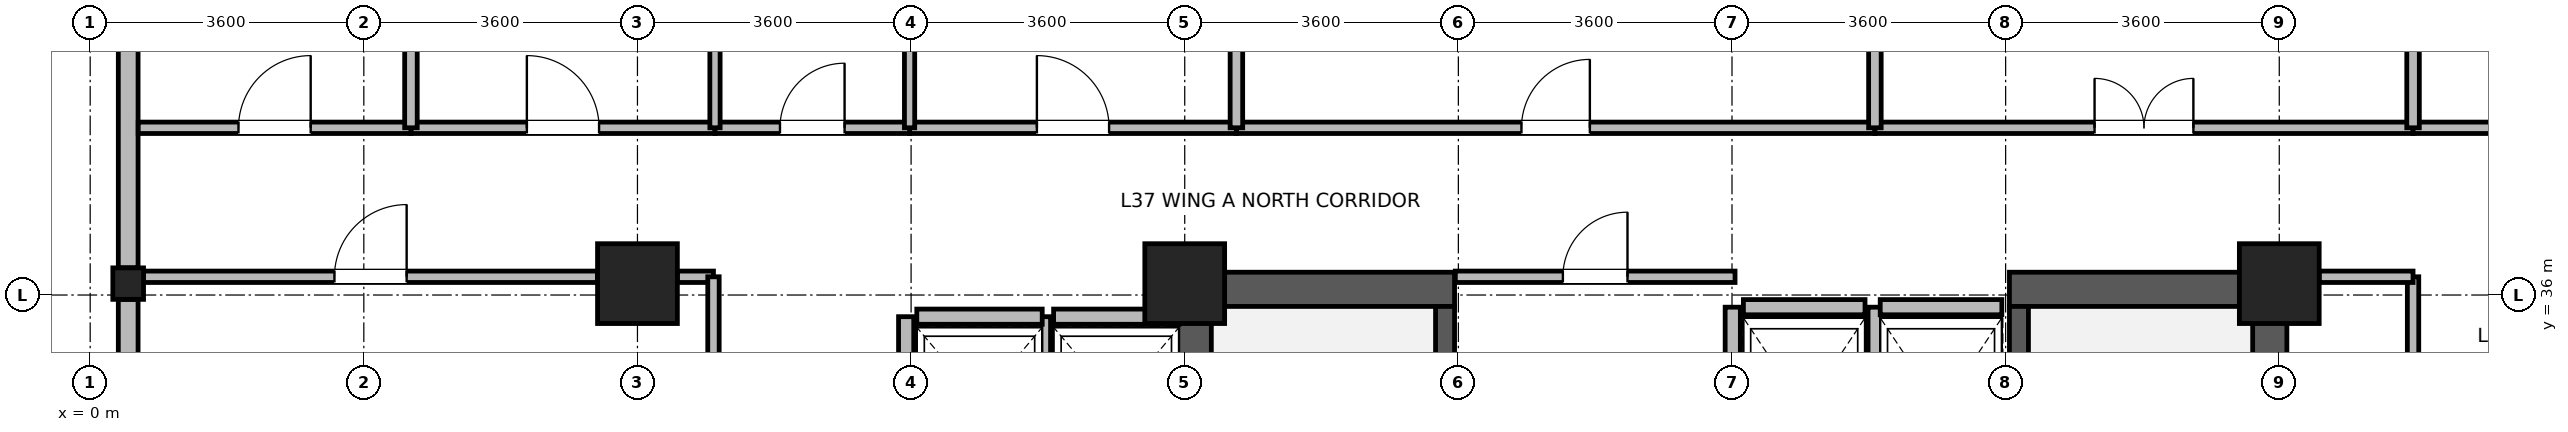
"""IFC4 building model, lengths in metres.
Left out: names, types, materials, properties, quantities, classifications, styles, units other than length and angle.
Written with IfcOpenShell. Run it as: python <this file> out.ifc"""

import sys

from ifc_helpers import new_model, si_unit, direction, frame, frame_2d, origin, origin_2d, place, context, subcontext, project, spatial, rectangle, i_section, extrude, source, transform, mapped, element, fill, save


model = new_model("IFC4")
c1 = context("Model", 3, precision=1e-05, world=origin(), true_north=direction((0.0, 1.0)))
c2 = subcontext(c1, "Body", "Model", "MODEL_VIEW")
j1 = project(units=[si_unit("LENGTHUNIT", "METRE"), si_unit("PLANEANGLEUNIT", "RADIAN")], contexts=[c1])
p1 = place(None, origin())
s1 = spatial("IfcSite", under=j1, at=p1, CompositionType="ELEMENT")
p2 = place(p1, origin())
s2 = spatial("IfcBuilding", under=s1, at=p2, CompositionType="ELEMENT")
p3 = place(p2, frame((0.0, 0.0, 147.6)))
s3 = spatial("IfcBuildingStorey", under=s2, at=p3, CompositionType="ELEMENT", Elevation=147.6)
for number, where, z_axis, x_axis in (
    (1, (14.525, 28.4, 0.0), (0.0, 0.0, 1.0), (0.0, 1.0, 0.0)),
    (2, (28.675, 28.4, 0.0), (0.0, 0.0, 1.0), (0.0, 1.0, 0.0)),
):
    element("IfcWall", number, at=place(p3, frame(where, z_axis=z_axis, x_axis=x_axis)), inside=s3, PredefinedType="SHEAR", context=c2, shape_type="SweptSolid", body=[
        extrude(rectangle(XDim=7.9, YDim=0.45, at=frame_2d((3.95, 0.0))), origin(), (0.0, 0.0, 1.0), 3.46),
    ])
for number, where, z_axis, x_axis in (
    (3, (14.75, 36.075, 0.0), (0.0, 0.0, 1.0), (1.0, 0.0, 0.0)),
    (4, (25.25, 36.075, 0.0), (0.0, 0.0, 1.0), (1.0, 0.0, 0.0)),
):
    element("IfcWall", number, at=place(p3, frame(where, z_axis=z_axis, x_axis=x_axis)), inside=s3, PredefinedType="SHEAR", context=c2, shape_type="SweptSolid", body=[
        extrude(rectangle(XDim=3.2, YDim=0.45, at=frame_2d((1.6, 0.0))), origin(), (0.0, 0.0, 1.0), 3.46),
    ])
p4 = place(p3, frame((17.825, 28.85, 0.0), z_axis=(0.0, 0.0, 1.0), x_axis=(0.0, 1.0, 0.0)))
e5 = element("IfcWall", 5, at=p4, inside=s3, PredefinedType="SHEAR", context=c2, shape_type="SweptSolid", body=[
    extrude(rectangle(XDim=7.0, YDim=0.25, at=frame_2d((3.5, 0.0))), origin(), (0.0, 0.0, 1.0), 3.46),
])
p5 = place(p4, frame((0.15, 0.0, 0.0)))
e6 = element("IfcOpeningElement", 6, at=p5, cuts=e5, PredefinedType="OPENING", context=c2, shape_type="SweptSolid", body=[
    extrude(rectangle(XDim=1.1, YDim=2.08, at=frame_2d((0.55, 1.04))), frame((0.0, 0.135, 0.0), z_axis=(0.0, -1.0, 0.0), x_axis=(1.0, 0.0, 0.0)), (0.0, 0.0, 1.0), 0.27),
])
p6 = place(p3, frame((25.375, 28.85, 0.0), z_axis=(0.0, 0.0, 1.0), x_axis=(0.0, 1.0, 0.0)))
e7 = element("IfcWall", 7, at=p6, inside=s3, PredefinedType="SHEAR", context=c2, shape_type="SweptSolid", body=[
    extrude(rectangle(XDim=7.0, YDim=0.25, at=frame_2d((3.5, 0.0))), origin(), (0.0, 0.0, 1.0), 3.46),
])
p7 = place(p6, frame((0.15, 0.0, 0.0)))
e8 = element("IfcOpeningElement", 8, at=p7, cuts=e7, PredefinedType="OPENING", context=c2, shape_type="SweptSolid", body=[
    extrude(rectangle(XDim=1.1, YDim=2.08, at=frame_2d((0.55, 1.04))), frame((0.0, 0.135, 0.0), z_axis=(0.0, -1.0, 0.0), x_axis=(1.0, 0.0, 0.0)), (0.0, 0.0, 1.0), 0.27),
])
m1 = source(origin(), c2, "Body", "SweptSolid", [
    extrude(rectangle(XDim=1.05, YDim=1.05, at=origin_2d()), origin(), (0.0, 0.0, 1.0), 3.7),
])
for number, where, z_axis, x_axis in (
    (9, (7.2, 36.15, 0.0), (0.0, 0.0, 1.0), (1.0, 0.0, 0.0)),
    (10, (14.4, 36.15, 0.0), (0.0, 0.0, 1.0), (1.0, 0.0, 0.0)),
    (11, (28.8, 36.15, 0.0), (0.0, 0.0, 1.0), (1.0, 0.0, 0.0)),
):
    element("IfcColumn", number, at=place(p3, frame(where, z_axis=z_axis, x_axis=x_axis)), inside=s3, PredefinedType="COLUMN", context=c2, shape_type="MappedRepresentation", body=[
        mapped(m1, transform((0.0, 0.0, 0.0), x_axis=(1.0, 0.0, 0.0), y_axis=(0.0, 1.0, 0.0), z_axis=(0.0, 0.0, 1.0), scale=1.0)),
    ])
m2 = source(origin(), c2, "Body", "SweptSolid", [
    extrude(i_section(OverallWidth=0.404, OverallDepth=0.414, WebThickness=0.021, FlangeThickness=0.028, FilletRadius=0.015, at=origin_2d()), origin(), (0.0, 0.0, 1.0), 3.7),
])
p8 = place(p3, frame((0.5, 36.15, 0.0), z_axis=(0.0, 0.0, 1.0), x_axis=(1.0, 0.0, 0.0)))
e12 = element("IfcColumn", 12, at=p8, inside=s3, PredefinedType="COLUMN", context=c2, shape_type="MappedRepresentation", body=[
    mapped(m2, transform((0.0, 0.0, 0.0), x_axis=(1.0, 0.0, 0.0), y_axis=(0.0, 1.0, 0.0), z_axis=(0.0, 0.0, 1.0), scale=1.0)),
])
p9 = place(p3, frame((0.5, 36.358, 0.0), z_axis=(0.0, 0.0, 1.0), x_axis=(0.0, 1.0, 0.0)))
e13 = element("IfcWall", 13, at=p9, inside=s3, PredefinedType="STANDARD", context=c2, shape_type="SweptSolid", body=[
    extrude(rectangle(XDim=6.972, YDim=0.26, at=frame_2d((3.486, 0.0))), origin(), (0.0, 0.0, 1.0), 3.44),
])
p10 = place(p9, frame((4.329, 0.0, 0.85)))
e14 = element("IfcOpeningElement", 14, at=p10, cuts=e13, PredefinedType="OPENING", context=c2, shape_type="SweptSolid", body=[
    extrude(rectangle(XDim=1.8, YDim=1.85, at=frame_2d((0.9, 0.925))), frame((0.0, 0.14, 0.0), z_axis=(0.0, -1.0, 0.0), x_axis=(1.0, 0.0, 0.0)), (0.0, 0.0, 1.0), 0.28),
])
p11 = place(p9, frame((3.011, 0.0, 0.85)))
e15 = element("IfcOpeningElement", 15, at=p11, cuts=e13, PredefinedType="OPENING", context=c2, shape_type="SweptSolid", body=[
    extrude(rectangle(XDim=0.95, YDim=1.75, at=frame_2d((0.475, 0.875))), frame((0.0, 0.14, 0.0), z_axis=(0.0, -1.0, 0.0), x_axis=(1.0, 0.0, 0.0)), (0.0, 0.0, 1.0), 0.28),
])
p12 = place(p3, frame((0.5, 28.858, 0.0), z_axis=(0.0, 0.0, 1.0), x_axis=(0.0, 1.0, 0.0)))
e16 = element("IfcWall", 16, at=p12, inside=s3, PredefinedType="STANDARD", context=c2, shape_type="SweptSolid", body=[
    extrude(rectangle(XDim=7.084, YDim=0.26, at=frame_2d((3.542, 0.0))), origin(), (0.0, 0.0, 1.0), 2.99),
])
p13 = place(p12, frame((0.871, 0.0, 0.85)))
e17 = element("IfcOpeningElement", 17, at=p13, cuts=e16, PredefinedType="OPENING", context=c2, shape_type="SweptSolid", body=[
    extrude(rectangle(XDim=1.8, YDim=1.85, at=frame_2d((0.9, 0.925))), frame((0.0, 0.14, 0.0), z_axis=(0.0, -1.0, 0.0), x_axis=(1.0, 0.0, 0.0)), (0.0, 0.0, 1.0), 0.28),
])
p14 = place(p12, frame((4.413, 0.0, 0.85)))
e18 = element("IfcOpeningElement", 18, at=p14, cuts=e16, PredefinedType="OPENING", context=c2, shape_type="SweptSolid", body=[
    extrude(rectangle(XDim=1.8, YDim=1.85, at=frame_2d((0.9, 0.925))), frame((0.0, 0.14, 0.0), z_axis=(0.0, -1.0, 0.0), x_axis=(1.0, 0.0, 0.0)), (0.0, 0.0, 1.0), 0.28),
])
p15 = place(p3, frame((12.675, 35.715, 0.0), z_axis=(0.0, 0.0, 1.0), x_axis=(1.0, 0.0, 0.0)))
e19 = element("IfcWall", 19, at=p15, inside=s3, PredefinedType="PARTITIONING", context=c2, shape_type="SweptSolid", body=[
    extrude(rectangle(XDim=1.65, YDim=0.2, at=frame_2d((0.825, 0.0))), origin(), (0.0, 0.0, 1.0), 3.44),
])
p16 = place(p3, frame((12.535, 33.485, 0.0), z_axis=(0.0, 0.0, 1.0), x_axis=(0.0, 1.0, 0.0)))
e20 = element("IfcWall", 20, at=p16, inside=s3, PredefinedType="PARTITIONING", context=c2, shape_type="SweptSolid", body=[
    extrude(rectangle(XDim=2.23, YDim=0.2, at=frame_2d((1.115, 0.0))), origin(), (0.0, 0.0, 1.0), 3.44),
])
p17 = place(p3, frame((10.875, 35.715, 0.0), z_axis=(0.0, 0.0, 1.0), x_axis=(1.0, 0.0, 0.0)))
e21 = element("IfcWall", 21, at=p17, inside=s3, PredefinedType="PARTITIONING", context=c2, shape_type="SweptSolid", body=[
    extrude(rectangle(XDim=1.65, YDim=0.2, at=frame_2d((0.825, 0.0))), origin(), (0.0, 0.0, 1.0), 3.44),
])
p18 = place(p3, frame((10.735, 33.485, 0.0), z_axis=(0.0, 0.0, 1.0), x_axis=(0.0, 1.0, 0.0)))
e22 = element("IfcWall", 22, at=p18, inside=s3, PredefinedType="PARTITIONING", context=c2, shape_type="SweptSolid", body=[
    extrude(rectangle(XDim=2.23, YDim=0.2, at=frame_2d((1.115, 0.0))), origin(), (0.0, 0.0, 1.0), 3.44),
])
p19 = place(p3, frame((21.75, 35.84, 0.0), z_axis=(0.0, 0.0, 1.0), x_axis=(1.0, 0.0, 0.0)))
e23 = element("IfcWall", 23, at=p19, inside=s3, PredefinedType="PARTITIONING", context=c2, shape_type="SweptSolid", body=[
    extrude(rectangle(XDim=1.6, YDim=0.2, at=frame_2d((0.8, 0.0))), origin(), (0.0, 0.0, 1.0), 2.44),
])
for number, where, z_axis, x_axis in (
    (24, (21.61, 33.16, 0.0), (0.0, 0.0, 1.0), (0.0, 1.0, 0.0)),
    (25, (23.49, 33.16, 0.0), (0.0, 0.0, 1.0), (0.0, 1.0, 0.0)),
):
    element("IfcWall", number, at=place(p3, frame(where, z_axis=z_axis, x_axis=x_axis)), inside=s3, PredefinedType="PARTITIONING", context=c2, shape_type="SweptSolid", body=[
        extrude(rectangle(XDim=2.68, YDim=0.2, at=frame_2d((1.34, 0.0))), origin(), (0.0, 0.0, 1.0), 3.44),
    ])
p20 = place(p3, frame((23.55, 35.84, 0.0), z_axis=(0.0, 0.0, 1.0), x_axis=(1.0, 0.0, 0.0)))
e26 = element("IfcWall", 26, at=p20, inside=s3, PredefinedType="PARTITIONING", context=c2, shape_type="SweptSolid", body=[
    extrude(rectangle(XDim=1.6, YDim=0.2, at=frame_2d((0.8, 0.0))), origin(), (0.0, 0.0, 1.0), 2.44),
])
p21 = place(p3, frame((15.08, 38.2, 0.0), z_axis=(0.0, 0.0, 1.0), x_axis=(1.0, 0.0, 0.0)))
e27 = element("IfcWall", 27, at=p21, inside=s3, PredefinedType="PARTITIONING", context=c2, shape_type="SweptSolid", body=[
    extrude(rectangle(XDim=8.4, YDim=0.15, at=frame_2d((4.2, 0.0))), origin(), (0.0, 0.0, 1.0), 3.44),
])
p22 = place(p21, frame((3.75, 0.0, 0.0)))
e28 = element("IfcOpeningElement", 28, at=p22, cuts=e27, PredefinedType="OPENING", context=c2, shape_type="SweptSolid", body=[
    extrude(rectangle(XDim=0.9, YDim=2.08, at=frame_2d((0.45, 1.04))), frame((0.0, 0.085, 0.0), z_axis=(0.0, -1.0, 0.0), x_axis=(1.0, 0.0, 0.0)), (0.0, 0.0, 1.0), 0.17),
])
p23 = place(p3, frame((0.702, 36.24, 0.0), z_axis=(0.0, 0.0, 1.0), x_axis=(1.0, 0.0, 0.0)))
e29 = element("IfcWall", 29, at=p23, inside=s3, PredefinedType="PARTITIONING", context=c2, shape_type="SweptSolid", body=[
    extrude(rectangle(XDim=5.973, YDim=0.15, at=frame_2d((2.987, 0.0))), origin(), (0.0, 0.0, 1.0), 2.84),
])
p24 = place(p23, frame((2.511, 0.0, 0.0)))
e30 = element("IfcOpeningElement", 30, at=p24, cuts=e29, PredefinedType="OPENING", context=c2, shape_type="SweptSolid", body=[
    extrude(rectangle(XDim=0.95, YDim=2.1, at=frame_2d((0.475, 1.05))), frame((0.0, 0.085, 0.0), z_axis=(0.0, -1.0, 0.0), x_axis=(1.0, 0.0, 0.0)), (0.0, 0.0, 1.0), 0.17),
])
p25 = place(p3, frame((7.725, 36.24, 0.0), z_axis=(0.0, 0.0, 1.0), x_axis=(1.0, 0.0, 0.0)))
e31 = element("IfcWall", 31, at=p25, inside=s3, PredefinedType="PARTITIONING", context=c2, shape_type="SweptSolid", body=[
    extrude(rectangle(XDim=0.475, YDim=0.15, at=frame_2d((0.237, 0.0))), origin(), (0.0, 0.0, 1.0), 2.84),
])
p26 = place(p3, frame((23.48, 38.2, 0.0), z_axis=(0.0, 0.0, 1.0), x_axis=(1.0, 0.0, 0.0)))
e32 = element("IfcWall", 32, at=p26, inside=s3, PredefinedType="PARTITIONING", context=c2, shape_type="SweptSolid", body=[
    extrude(rectangle(XDim=7.08, YDim=0.15, at=frame_2d((3.54, 0.0))), origin(), (0.0, 0.0, 1.0), 3.44),
])
p27 = place(p26, frame((2.89, 0.0, 0.0)))
e33 = element("IfcOpeningElement", 33, at=p27, cuts=e32, PredefinedType="OPENING", context=c2, shape_type="SweptSolid", body=[
    extrude(rectangle(XDim=1.3, YDim=2.12, at=frame_2d((0.65, 1.06))), frame((0.0, 0.085, 0.0), z_axis=(0.0, -1.0, 0.0), x_axis=(1.0, 0.0, 0.0)), (0.0, 0.0, 1.0), 0.17),
])
p28 = place(p3, frame((30.56, 38.2, 0.0), z_axis=(0.0, 0.0, 1.0), x_axis=(1.0, 0.0, 0.0)))
e34 = element("IfcWall", 34, at=p28, inside=s3, PredefinedType="PARTITIONING", context=c2, shape_type="SweptSolid", body=[
    extrude(rectangle(XDim=4.8, YDim=0.15, at=frame_2d((2.4, 0.0))), origin(), (0.0, 0.0, 1.0), 3.44),
])
p29 = place(p28, frame((1.75, 0.0, 0.0)))
e35 = element("IfcOpeningElement", 35, at=p29, cuts=e34, PredefinedType="OPENING", context=c2, shape_type="SweptSolid", body=[
    extrude(rectangle(XDim=1.3, YDim=2.12, at=frame_2d((0.65, 1.06))), frame((0.0, 0.085, 0.0), z_axis=(0.0, -1.0, 0.0), x_axis=(1.0, 0.0, 0.0)), (0.0, 0.0, 1.0), 0.17),
])
p30 = place(p3, frame((10.78, 38.2, 0.0), z_axis=(0.0, 0.0, 1.0), x_axis=(1.0, 0.0, 0.0)))
e36 = element("IfcWall", 36, at=p30, inside=s3, PredefinedType="PARTITIONING", context=c2, shape_type="SweptSolid", body=[
    extrude(rectangle(XDim=4.3, YDim=0.15, at=frame_2d((2.15, 0.0))), origin(), (0.0, 0.0, 1.0), 3.44),
])
p31 = place(p30, frame((1.675, 0.0, 0.0)))
e37 = element("IfcOpeningElement", 37, at=p31, cuts=e36, PredefinedType="OPENING", context=c2, shape_type="SweptSolid", body=[
    extrude(rectangle(XDim=0.95, YDim=2.1, at=frame_2d((0.475, 1.05))), frame((0.0, 0.085, 0.0), z_axis=(0.0, -1.0, 0.0), x_axis=(1.0, 0.0, 0.0)), (0.0, 0.0, 1.0), 0.17),
])
p32 = place(p3, frame((4.22, 38.2, 0.0), z_axis=(0.0, 0.0, 1.0), x_axis=(1.0, 0.0, 0.0)))
e38 = element("IfcWall", 38, at=p32, inside=s3, PredefinedType="PARTITIONING", context=c2, shape_type="SweptSolid", body=[
    extrude(rectangle(XDim=4.0, YDim=0.15, at=frame_2d((2.0, 0.0))), origin(), (0.0, 0.0, 1.0), 3.44),
])
p33 = place(p32, frame((1.525, 0.0, 0.0)))
e39 = element("IfcOpeningElement", 39, at=p33, cuts=e38, PredefinedType="OPENING", context=c2, shape_type="SweptSolid", body=[
    extrude(rectangle(XDim=0.95, YDim=2.1, at=frame_2d((0.475, 1.05))), frame((0.0, 0.085, 0.0), z_axis=(0.0, -1.0, 0.0), x_axis=(1.0, 0.0, 0.0)), (0.0, 0.0, 1.0), 0.17),
])
p34 = place(p3, frame((8.2, 32.4, 0.0), z_axis=(0.0, 0.0, 1.0), x_axis=(0.0, 1.0, 0.0)))
e40 = element("IfcWall", 40, at=p34, inside=s3, PredefinedType="PARTITIONING", context=c2, shape_type="SweptSolid", body=[
    extrude(rectangle(XDim=3.84, YDim=0.15, at=frame_2d((1.92, 0.0))), origin(), (0.0, 0.0, 1.0), 3.44),
])
p35 = place(p3, frame((30.56, 32.4, 0.0), z_axis=(0.0, 0.0, 1.0), x_axis=(0.0, 1.0, 0.0)))
e41 = element("IfcWall", 41, at=p35, inside=s3, PredefinedType="PARTITIONING", context=c2, shape_type="SweptSolid", body=[
    extrude(rectangle(XDim=3.84, YDim=0.15, at=frame_2d((1.92, 0.0))), origin(), (0.0, 0.0, 1.0), 3.44),
])
p36 = place(p35, frame((1.27, 0.0, 0.0)))
e42 = element("IfcOpeningElement", 42, at=p36, cuts=e41, PredefinedType="OPENING", context=c2, shape_type="SweptSolid", body=[
    extrude(rectangle(XDim=1.3, YDim=2.12, at=frame_2d((0.65, 1.06))), frame((0.0, 0.085, 0.0), z_axis=(0.0, -1.0, 0.0), x_axis=(1.0, 0.0, 0.0)), (0.0, 0.0, 1.0), 0.17),
])
p37 = place(p3, frame((0.632, 38.2, 0.0), z_axis=(0.0, 0.0, 1.0), x_axis=(1.0, 0.0, 0.0)))
e43 = element("IfcWall", 43, at=p37, inside=s3, PredefinedType="PARTITIONING", context=c2, shape_type="SweptSolid", body=[
    extrude(rectangle(XDim=3.588, YDim=0.15, at=frame_2d((1.794, 0.0))), origin(), (0.0, 0.0, 1.0), 3.44),
])
p38 = place(p37, frame((1.319, 0.0, 0.0)))
e44 = element("IfcOpeningElement", 44, at=p38, cuts=e43, PredefinedType="OPENING", context=c2, shape_type="SweptSolid", body=[
    extrude(rectangle(XDim=0.95, YDim=2.1, at=frame_2d((0.475, 1.05))), frame((0.0, 0.085, 0.0), z_axis=(0.0, -1.0, 0.0), x_axis=(1.0, 0.0, 0.0)), (0.0, 0.0, 1.0), 0.17),
])
p39 = place(p3, frame((17.96, 36.24, 0.0), z_axis=(0.0, 0.0, 1.0), x_axis=(1.0, 0.0, 0.0)))
e45 = element("IfcWall", 45, at=p39, inside=s3, PredefinedType="PARTITIONING", context=c2, shape_type="SweptSolid", body=[
    extrude(rectangle(XDim=3.68, YDim=0.15, at=frame_2d((1.84, 0.0))), origin(), (0.0, 0.0, 1.0), 2.44),
])
p40 = place(p39, frame((1.415, 0.0, 0.0)))
e46 = element("IfcOpeningElement", 46, at=p40, cuts=e45, PredefinedType="OPENING", context=c2, shape_type="SweptSolid", body=[
    extrude(rectangle(XDim=0.85, YDim=2.04, at=frame_2d((0.425, 1.02))), frame((0.0, 0.085, 0.0), z_axis=(0.0, -1.0, 0.0), x_axis=(1.0, 0.0, 0.0)), (0.0, 0.0, 1.0), 0.17),
])
p41 = place(p3, frame((8.22, 38.2, 0.0), z_axis=(0.0, 0.0, 1.0), x_axis=(1.0, 0.0, 0.0)))
e47 = element("IfcWall", 47, at=p41, inside=s3, PredefinedType="PARTITIONING", context=c2, shape_type="SweptSolid", body=[
    extrude(rectangle(XDim=2.56, YDim=0.15, at=frame_2d((1.28, 0.0))), origin(), (0.0, 0.0, 1.0), 3.44),
])
p42 = place(p41, frame((0.855, 0.0, 0.0)))
e48 = element("IfcOpeningElement", 48, at=p42, cuts=e47, PredefinedType="OPENING", context=c2, shape_type="SweptSolid", body=[
    extrude(rectangle(XDim=0.85, YDim=2.04, at=frame_2d((0.425, 1.02))), frame((0.0, 0.085, 0.0), z_axis=(0.0, -1.0, 0.0), x_axis=(1.0, 0.0, 0.0)), (0.0, 0.0, 1.0), 0.17),
])
p43 = place(p3, frame((29.325, 36.24, 0.0), z_axis=(0.0, 0.0, 1.0), x_axis=(1.0, 0.0, 0.0)))
e49 = element("IfcWall", 49, at=p43, inside=s3, PredefinedType="PARTITIONING", context=c2, shape_type="SweptSolid", body=[
    extrude(rectangle(XDim=1.235, YDim=0.15, at=frame_2d((0.618, 0.0))), origin(), (0.0, 0.0, 1.0), 2.84),
])
p44 = place(p3, frame((4.22, 38.2, 0.0), z_axis=(0.0, 0.0, 1.0), x_axis=(0.0, 1.0, 0.0)))
e50 = element("IfcWall", 50, at=p44, inside=s3, PredefinedType="PARTITIONING", context=c2, shape_type="SweptSolid", body=[
    extrude(rectangle(XDim=4.868, YDim=0.165, at=frame_2d((2.434, 0.0))), origin(), (0.0, 0.0, 1.0), 3.44),
])
for number, where, z_axis, x_axis in (
    (51, (8.22, 38.2, 0.0), (0.0, 0.0, 1.0), (0.0, 1.0, 0.0)),
    (52, (10.78, 38.2, 0.0), (0.0, 0.0, 1.0), (0.0, 1.0, 0.0)),
):
    element("IfcWall", number, at=place(p3, frame(where, z_axis=z_axis, x_axis=x_axis)), inside=s3, PredefinedType="PARTITIONING", context=c2, shape_type="SweptSolid", body=[
        extrude(rectangle(XDim=4.868, YDim=0.135, at=frame_2d((2.434, 0.0))), origin(), (0.0, 0.0, 1.0), 3.44),
    ])
for number, where, z_axis, x_axis in (
    (53, (15.08, 38.2, 0.0), (0.0, 0.0, 1.0), (0.0, 1.0, 0.0)),
    (54, (23.48, 38.2, 0.0), (0.0, 0.0, 1.0), (0.0, 1.0, 0.0)),
    (55, (30.56, 38.2, 0.0), (0.0, 0.0, 1.0), (0.0, 1.0, 0.0)),
):
    element("IfcWall", number, at=place(p3, frame(where, z_axis=z_axis, x_axis=x_axis)), inside=s3, PredefinedType="PARTITIONING", context=c2, shape_type="SweptSolid", body=[
        extrude(rectangle(XDim=4.868, YDim=0.165, at=frame_2d((2.434, 0.0))), origin(), (0.0, 0.0, 1.0), 3.44),
    ])
p45 = place(p22, origin())
e56 = element("IfcDoor", 56, at=p45, inside=s3, OperationType="SINGLE_SWING_RIGHT", PredefinedType="DOOR", context=c2, shape_type="SweptSolid", body=[
    extrude(rectangle(XDim=0.9, YDim=2.08, at=frame_2d((0.45, 1.04))), frame((0.0, 0.025, 0.0), z_axis=(0.0, -1.0, 0.0), x_axis=(1.0, 0.0, 0.0)), (0.0, 0.0, 1.0), 0.05),
])
fill(e28, e56)
p46 = place(p24, origin())
e57 = element("IfcDoor", 57, at=p46, inside=s3, OperationType="SINGLE_SWING_RIGHT", PredefinedType="DOOR", context=c2, shape_type="SweptSolid", body=[
    extrude(rectangle(XDim=0.95, YDim=2.1, at=frame_2d((0.475, 1.05))), frame((0.0, 0.025, 0.0), z_axis=(0.0, -1.0, 0.0), x_axis=(1.0, 0.0, 0.0)), (0.0, 0.0, 1.0), 0.05),
])
fill(e30, e57)
p47 = place(p27, origin())
e58 = element("IfcDoor", 58, at=p47, inside=s3, OperationType="DOUBLE_DOOR_SINGLE_SWING", PredefinedType="DOOR", context=c2, shape_type="SweptSolid", body=[
    extrude(rectangle(XDim=1.3, YDim=2.12, at=frame_2d((0.65, 1.06))), frame((0.0, 0.025, 0.0), z_axis=(0.0, -1.0, 0.0), x_axis=(1.0, 0.0, 0.0)), (0.0, 0.0, 1.0), 0.05),
])
fill(e33, e58)
p48 = place(p31, origin())
e59 = element("IfcDoor", 59, at=p48, inside=s3, OperationType="SINGLE_SWING_LEFT", PredefinedType="DOOR", context=c2, shape_type="SweptSolid", body=[
    extrude(rectangle(XDim=0.95, YDim=2.1, at=frame_2d((0.475, 1.05))), frame((0.0, 0.025, 0.0), z_axis=(0.0, -1.0, 0.0), x_axis=(1.0, 0.0, 0.0)), (0.0, 0.0, 1.0), 0.05),
])
fill(e37, e59)
p49 = place(p33, origin())
e60 = element("IfcDoor", 60, at=p49, inside=s3, OperationType="SINGLE_SWING_LEFT", PredefinedType="DOOR", context=c2, shape_type="SweptSolid", body=[
    extrude(rectangle(XDim=0.95, YDim=2.1, at=frame_2d((0.475, 1.05))), frame((0.0, 0.025, 0.0), z_axis=(0.0, -1.0, 0.0), x_axis=(1.0, 0.0, 0.0)), (0.0, 0.0, 1.0), 0.05),
])
fill(e39, e60)
p50 = place(p38, origin())
e61 = element("IfcDoor", 61, at=p50, inside=s3, OperationType="SINGLE_SWING_RIGHT", PredefinedType="DOOR", context=c2, shape_type="SweptSolid", body=[
    extrude(rectangle(XDim=0.95, YDim=2.1, at=frame_2d((0.475, 1.05))), frame((0.0, 0.025, 0.0), z_axis=(0.0, -1.0, 0.0), x_axis=(1.0, 0.0, 0.0)), (0.0, 0.0, 1.0), 0.05),
])
fill(e44, e61)
p51 = place(p40, origin())
e62 = element("IfcDoor", 62, at=p51, inside=s3, OperationType="SINGLE_SWING_RIGHT", PredefinedType="DOOR", context=c2, shape_type="SweptSolid", body=[
    extrude(rectangle(XDim=0.85, YDim=2.04, at=frame_2d((0.425, 1.02))), frame((0.0, 0.025, 0.0), z_axis=(0.0, -1.0, 0.0), x_axis=(1.0, 0.0, 0.0)), (0.0, 0.0, 1.0), 0.05),
])
fill(e46, e62)
p52 = place(p42, origin())
e63 = element("IfcDoor", 63, at=p52, inside=s3, OperationType="SINGLE_SWING_RIGHT", PredefinedType="DOOR", context=c2, shape_type="SweptSolid", body=[
    extrude(rectangle(XDim=0.85, YDim=2.04, at=frame_2d((0.425, 1.02))), frame((0.0, 0.025, 0.0), z_axis=(0.0, -1.0, 0.0), x_axis=(1.0, 0.0, 0.0)), (0.0, 0.0, 1.0), 0.05),
])
fill(e48, e63)
save(model, sys.argv[1])
